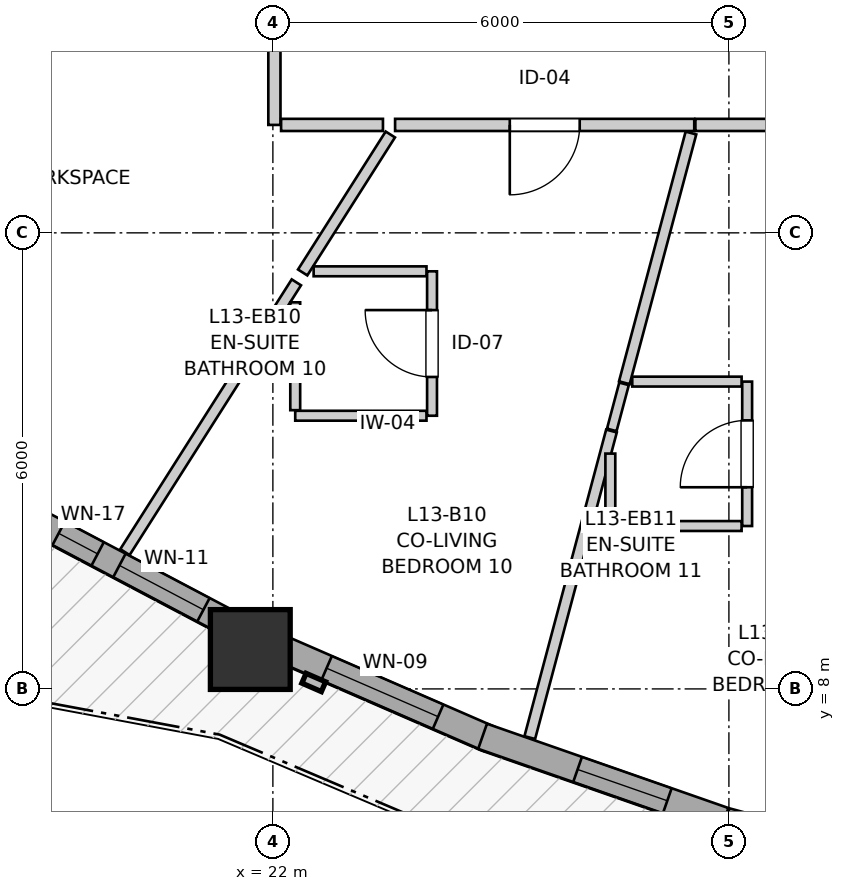
"""IFC4 building model, lengths in metres.
Left out: names, types, materials, properties, quantities, classifications, styles, units other than length and angle.
Written with IfcOpenShell. Run it as: python <this file> out.ifc"""

import sys

from ifc_helpers import new_model, si_unit, direction, frame, frame_2d, origin, origin_2d, place, context, subcontext, project, spatial, rectangle, extrude, source, transform, mapped, element, fill, save


model = new_model("IFC4")
c1 = context("Model", 3, precision=1e-05, world=origin(), true_north=direction((0.0, 1.0)))
c2 = subcontext(c1, "Body", "Model", "MODEL_VIEW")
j1 = project(units=[si_unit("LENGTHUNIT", "METRE"), si_unit("PLANEANGLEUNIT", "RADIAN")], contexts=[c1])
p1 = place(None, origin())
s1 = spatial("IfcSite", under=j1, at=p1, CompositionType="ELEMENT")
p2 = place(p1, origin())
s2 = spatial("IfcBuilding", under=s1, at=p2, CompositionType="ELEMENT")
p3 = place(p2, frame((0.0, 0.0, 46.2)))
s3 = spatial("IfcBuildingStorey", under=s2, at=p3, CompositionType="ELEMENT", Elevation=46.2)
m1 = source(origin(), c2, "Body", "SweptSolid", [
    extrude(rectangle(XDim=1.05, YDim=1.05, at=origin_2d()), origin(), (0.0, 0.0, 1.0), 2.94),
])
p4 = place(p3, frame((21.703, 8.518, 0.0), z_axis=(0.0, 0.0, 1.0), x_axis=(1.0, 0.0, 0.0)))
e1 = element("IfcColumn", 1, at=p4, inside=s3, PredefinedType="COLUMN", context=c2, shape_type="MappedRepresentation", body=[
    mapped(m1, transform((0.0, 0.0, 0.0), x_axis=(1.0, 0.0, 0.0), y_axis=(0.0, 1.0, 0.0), z_axis=(0.0, 0.0, 1.0), scale=1.0)),
])
p5 = place(p3, frame((18.842, 10.226, 0.0), z_axis=(0.0, 0.0, 1.0), x_axis=(0.884373657766, -0.466779641211, 0.0)))
e2 = element("IfcWall", 2, at=p5, inside=s3, PredefinedType="SOLIDWALL", context=c2, shape_type="SweptSolid", body=[
    extrude(rectangle(XDim=3.028, YDim=0.35, at=frame_2d((1.514, 0.0))), origin(), (0.0, 0.0, 1.0), 2.42),
])
p6 = place(p5, frame((0.384, 0.0, 0.82)))
e3 = element("IfcOpeningElement", 3, at=p6, cuts=e2, PredefinedType="OPENING", context=c2, shape_type="SweptSolid", body=[
    extrude(rectangle(XDim=0.58, YDim=1.35, at=frame_2d((0.29, 0.675))), frame((0.0, 0.185, 0.0), z_axis=(0.0, -1.0, 0.0), x_axis=(1.0, 0.0, 0.0)), (0.0, 0.0, 1.0), 0.37),
])
p7 = place(p5, frame((1.288, 0.0, 0.82)))
e4 = element("IfcOpeningElement", 4, at=p7, cuts=e2, PredefinedType="OPENING", context=c2, shape_type="SweptSolid", body=[
    extrude(rectangle(XDim=1.25, YDim=1.35, at=frame_2d((0.625, 0.675))), frame((0.0, 0.185, 0.0), z_axis=(0.0, -1.0, 0.0), x_axis=(1.0, 0.0, 0.0)), (0.0, 0.0, 1.0), 0.37),
])
p8 = place(p3, frame((22.048, 8.559, 0.0), z_axis=(0.0, 0.0, 1.0), x_axis=(0.9170891658, -0.398682156576, 0.0)))
e5 = element("IfcWall", 5, at=p8, inside=s3, PredefinedType="SOLIDWALL", context=c2, shape_type="SweptSolid", body=[
    extrude(rectangle(XDim=3.047, YDim=0.35, at=frame_2d((1.523, 0.0))), origin(), (0.0, 0.0, 1.0), 2.42),
])
p9 = place(p8, frame((0.719, 0.0, 0.82)))
e6 = element("IfcOpeningElement", 6, at=p9, cuts=e5, PredefinedType="OPENING", context=c2, shape_type="SweptSolid", body=[
    extrude(rectangle(XDim=1.6, YDim=1.35, at=frame_2d((0.8, 0.675))), frame((0.0, 0.185, 0.0), z_axis=(0.0, -1.0, 0.0), x_axis=(1.0, 0.0, 0.0)), (0.0, 0.0, 1.0), 0.37),
])
p10 = place(p3, frame((24.759, 7.377, 0.0), z_axis=(0.0, 0.0, 1.0), x_axis=(0.94414085716, -0.329542170051, 0.0)))
e7 = element("IfcWall", 7, at=p10, inside=s3, PredefinedType="SOLIDWALL", context=c2, shape_type="SweptSolid", body=[
    extrude(rectangle(XDim=3.364, YDim=0.35, at=frame_2d((1.682, 0.0))), origin(), (0.0, 0.0, 1.0), 2.42),
])
p11 = place(p10, frame((1.324, 0.0, 0.82)))
e8 = element("IfcOpeningElement", 8, at=p11, cuts=e7, PredefinedType="OPENING", context=c2, shape_type="SweptSolid", body=[
    extrude(rectangle(XDim=1.25, YDim=1.35, at=frame_2d((0.625, 0.675))), frame((0.0, 0.185, 0.0), z_axis=(0.0, -1.0, 0.0), x_axis=(1.0, 0.0, 0.0)), (0.0, 0.0, 1.0), 0.37),
])
p12 = place(p3, frame((27.961, 6.26, 0.0), z_axis=(0.0, 0.0, 1.0), x_axis=(0.96545566601, -0.260567375106, 0.0)))
e9 = element("IfcWall", 9, at=p12, inside=s3, PredefinedType="SOLIDWALL", context=c2, shape_type="SweptSolid", body=[
    extrude(rectangle(XDim=3.42, YDim=0.35, at=frame_2d((1.71, 0.0))), origin(), (0.0, 0.0, 1.0), 2.42),
])
p13 = place(p12, frame((0.738, 0.0, 0.82)))
e10 = element("IfcOpeningElement", 10, at=p13, cuts=e9, PredefinedType="OPENING", context=c2, shape_type="SweptSolid", body=[
    extrude(rectangle(XDim=1.25, YDim=1.35, at=frame_2d((0.625, 0.675))), frame((0.0, 0.185, 0.0), z_axis=(0.0, -1.0, 0.0), x_axis=(1.0, 0.0, 0.0)), (0.0, 0.0, 1.0), 0.37),
])
p14 = place(p3, frame((22.02, 15.42, 0.0), z_axis=(0.0, 0.0, 1.0), x_axis=(0.0, 1.0, 0.0)))
e11 = element("IfcWall", 11, at=p14, inside=s3, PredefinedType="PARTITIONING", context=c2, shape_type="SweptSolid", body=[
    extrude(rectangle(XDim=5.786, YDim=0.16, at=frame_2d((2.893, 0.0))), origin(), (0.0, 0.0, 1.0), 2.94),
])
p15 = place(p14, frame((2.405, 0.0, 0.0)))
e12 = element("IfcOpeningElement", 12, at=p15, cuts=e11, PredefinedType="OPENING", context=c2, shape_type="SweptSolid", body=[
    extrude(rectangle(XDim=0.96, YDim=2.1, at=frame_2d((0.48, 1.05))), frame((0.0, 0.09, 0.0), z_axis=(0.0, -1.0, 0.0), x_axis=(1.0, 0.0, 0.0)), (0.0, 0.0, 1.0), 0.18),
])
p16 = place(p3, frame((27.544, 15.42, 0.0), z_axis=(0.0, 0.0, 1.0), x_axis=(-1.0, 0.0, 0.0)))
e13 = element("IfcWall", 13, at=p16, inside=s3, PredefinedType="PARTITIONING", context=c2, shape_type="SweptSolid", body=[
    extrude(rectangle(XDim=3.936, YDim=0.16, at=frame_2d((1.968, 0.0))), origin(), (0.0, 0.0, 1.0), 2.94),
])
p17 = place(p16, frame((1.507, 0.0, 0.0)))
e14 = element("IfcOpeningElement", 14, at=p17, cuts=e13, PredefinedType="OPENING", context=c2, shape_type="SweptSolid", body=[
    extrude(rectangle(XDim=0.92, YDim=2.1, at=frame_2d((0.46, 1.05))), frame((0.0, 0.09, 0.0), z_axis=(0.0, -1.0, 0.0), x_axis=(1.0, 0.0, 0.0)), (0.0, 0.0, 1.0), 0.18),
])
p18 = place(p3, frame((30.484, 15.42, 0.0), z_axis=(0.0, 0.0, 1.0), x_axis=(-1.0, 0.0, 0.0)))
e15 = element("IfcWall", 15, at=p18, inside=s3, PredefinedType="PARTITIONING", context=c2, shape_type="SweptSolid", body=[
    extrude(rectangle(XDim=2.925, YDim=0.16, at=frame_2d((1.462, 0.0))), origin(), (0.0, 0.0, 1.0), 2.94),
])
p19 = place(p18, frame((1.025, 0.0, 0.0)))
e16 = element("IfcOpeningElement", 16, at=p19, cuts=e15, PredefinedType="OPENING", context=c2, shape_type="SweptSolid", body=[
    extrude(rectangle(XDim=0.92, YDim=2.1, at=frame_2d((0.46, 1.05))), frame((0.0, 0.09, 0.0), z_axis=(0.0, -1.0, 0.0), x_axis=(1.0, 0.0, 0.0)), (0.0, 0.0, 1.0), 0.18),
])
p20 = place(p3, frame((24.094, 11.594, 0.0), z_axis=(0.0, 0.0, 1.0), x_axis=(0.0, 1.0, 0.0)))
e17 = element("IfcWall", 17, at=p20, inside=s3, PredefinedType="PARTITIONING", context=c2, shape_type="SweptSolid", body=[
    extrude(rectangle(XDim=1.9, YDim=0.13, at=frame_2d((0.95, 0.0))), origin(), (0.0, 0.0, 1.0), 2.94),
])
p21 = place(p20, frame((0.51, 0.0, 0.0)))
e18 = element("IfcOpeningElement", 18, at=p21, cuts=e17, PredefinedType="OPENING", context=c2, shape_type="SweptSolid", body=[
    extrude(rectangle(XDim=0.88, YDim=2.05, at=frame_2d((0.44, 1.025))), frame((0.0, 0.075, 0.0), z_axis=(0.0, -1.0, 0.0), x_axis=(1.0, 0.0, 0.0)), (0.0, 0.0, 1.0), 0.15),
])
p22 = place(p3, frame((28.24, 10.143, 0.0), z_axis=(0.0, 0.0, 1.0), x_axis=(0.0, 1.0, 0.0)))
e19 = element("IfcWall", 19, at=p22, inside=s3, PredefinedType="PARTITIONING", context=c2, shape_type="SweptSolid", body=[
    extrude(rectangle(XDim=1.9, YDim=0.13, at=frame_2d((0.95, 0.0))), origin(), (0.0, 0.0, 1.0), 2.94),
])
p23 = place(p22, frame((0.51, 0.0, 0.0)))
e20 = element("IfcOpeningElement", 20, at=p23, cuts=e19, PredefinedType="OPENING", context=c2, shape_type="SweptSolid", body=[
    extrude(rectangle(XDim=0.88, YDim=2.05, at=frame_2d((0.44, 1.025))), frame((0.0, 0.075, 0.0), z_axis=(0.0, -1.0, 0.0), x_axis=(1.0, 0.0, 0.0)), (0.0, 0.0, 1.0), 0.15),
])
p24 = place(p3, frame((12.009, 15.406, 0.0), z_axis=(0.0, 0.0, 1.0), x_axis=(0.865925986209, 0.500172156771, 0.0)))
e21 = element("IfcWall", 21, at=p24, inside=s3, PredefinedType="PARTITIONING", context=c2, shape_type="SweptSolid", body=[
    extrude(rectangle(XDim=11.419, YDim=0.145, at=frame_2d((5.709, 0.0))), origin(), (0.0, 0.0, 1.0), 2.94),
])
p25 = place(p3, frame((20.054, 9.8, 0.0), z_axis=(0.0, 0.0, 1.0), x_axis=(0.536345686693, 0.843998403059, 0.0)))
e22 = element("IfcWall", 22, at=p25, inside=s3, PredefinedType="PARTITIONING", context=c2, shape_type="SweptSolid", body=[
    extrude(rectangle(XDim=4.205, YDim=0.145, at=frame_2d((2.103, 0.0))), origin(), (0.0, 0.0, 1.0), 2.94),
])
p26 = place(p3, frame((25.38, 7.36, 0.0), z_axis=(0.0, 0.0, 1.0), x_axis=(0.257575283531, 0.966258233245, 0.0)))
e23 = element("IfcWall", 23, at=p26, inside=s3, PredefinedType="PARTITIONING", context=c2, shape_type="SweptSolid", body=[
    extrude(rectangle(XDim=4.174, YDim=0.145, at=frame_2d((2.087, 0.0))), origin(), (0.0, 0.0, 1.0), 2.94),
])
p27 = place(p3, frame((26.624, 12.028, 0.0), z_axis=(0.0, 0.0, 1.0), x_axis=(0.257743083598, 0.966213487205, 0.0)))
e24 = element("IfcWall", 24, at=p27, inside=s3, PredefinedType="PARTITIONING", context=c2, shape_type="SweptSolid", body=[
    extrude(rectangle(XDim=3.401, YDim=0.145, at=frame_2d((1.7, 0.0))), origin(), (0.0, 0.0, 1.0), 2.94),
])
p28 = place(p3, frame((22.392, 13.479, 0.0), z_axis=(0.0, 0.0, 1.0), x_axis=(0.53614810629, 0.844123929362, 0.0)))
e25 = element("IfcWall", 25, at=p28, inside=s3, PredefinedType="PARTITIONING", context=c2, shape_type="SweptSolid", body=[
    extrude(rectangle(XDim=2.151, YDim=0.145, at=frame_2d((1.075, 0.0))), origin(), (0.0, 0.0, 1.0), 2.94),
])
p29 = place(p3, frame((22.294, 11.594, 0.0), z_axis=(0.0, 0.0, 1.0), x_axis=(1.0, 0.0, 0.0)))
e26 = element("IfcWall", 26, at=p29, inside=s3, PredefinedType="PARTITIONING", context=c2, shape_type="SweptSolid", body=[
    extrude(rectangle(XDim=1.727, YDim=0.13, at=frame_2d((0.864, 0.0))), origin(), (0.0, 0.0, 1.0), 2.94),
])
p30 = place(p3, frame((26.44, 10.143, 0.0), z_axis=(0.0, 0.0, 1.0), x_axis=(1.0, 0.0, 0.0)))
e27 = element("IfcWall", 27, at=p30, inside=s3, PredefinedType="PARTITIONING", context=c2, shape_type="SweptSolid", body=[
    extrude(rectangle(XDim=1.727, YDim=0.13, at=frame_2d((0.864, 0.0))), origin(), (0.0, 0.0, 1.0), 2.508),
])
p31 = place(p3, frame((22.294, 11.667, 0.0), z_axis=(0.0, 0.0, 1.0), x_axis=(0.0, 1.0, 0.0)))
e28 = element("IfcWall", 28, at=p31, inside=s3, PredefinedType="PARTITIONING", context=c2, shape_type="SweptSolid", body=[
    extrude(rectangle(XDim=1.419, YDim=0.13, at=frame_2d((0.709, 0.0))), origin(), (0.0, 0.0, 1.0), 2.94),
])
p32 = place(p3, frame((22.536, 13.494, 0.0), z_axis=(0.0, 0.0, 1.0), x_axis=(1.0, 0.0, 0.0)))
e29 = element("IfcWall", 29, at=p32, inside=s3, PredefinedType="PARTITIONING", context=c2, shape_type="SweptSolid", body=[
    extrude(rectangle(XDim=1.485, YDim=0.13, at=frame_2d((0.742, 0.0))), origin(), (0.0, 0.0, 1.0), 2.94),
])
p33 = place(p3, frame((26.729, 12.043, 0.0), z_axis=(0.0, 0.0, 1.0), x_axis=(1.0, 0.0, 0.0)))
e30 = element("IfcWall", 30, at=p33, inside=s3, PredefinedType="PARTITIONING", context=c2, shape_type="SweptSolid", body=[
    extrude(rectangle(XDim=1.438, YDim=0.13, at=frame_2d((0.719, 0.0))), origin(), (0.0, 0.0, 1.0), 2.94),
])
p34 = place(p3, frame((22.108, 15.42, 0.0), z_axis=(0.0, 0.0, 1.0), x_axis=(1.0, 0.0, 0.0)))
e31 = element("IfcWall", 31, at=p34, inside=s3, PredefinedType="PARTITIONING", context=c2, shape_type="SweptSolid", body=[
    extrude(rectangle(XDim=1.34, YDim=0.16, at=frame_2d((0.67, 0.0))), origin(), (0.0, 0.0, 1.0), 2.94),
])
p35 = place(p3, frame((26.44, 10.216, 0.0), z_axis=(0.0, 0.0, 1.0), x_axis=(0.0, 1.0, 0.0)))
e32 = element("IfcWall", 32, at=p35, inside=s3, PredefinedType="PARTITIONING", context=c2, shape_type="SweptSolid", body=[
    extrude(rectangle(XDim=0.88, YDim=0.13, at=frame_2d((0.44, 0.0))), origin(), (0.0, 0.0, 1.0), 2.94),
])
p36 = place(p3, frame((26.459, 11.407, 0.0), z_axis=(0.0, 0.0, 1.0), x_axis=(0.256984017378, 0.966415653232, 0.0)))
e33 = element("IfcWall", 33, at=p36, inside=s3, PredefinedType="PARTITIONING", context=c2, shape_type="SweptSolid", body=[
    extrude(rectangle(XDim=0.627, YDim=0.13, at=frame_2d((0.313, 0.0))), origin(), (0.0, 0.0, 1.0), 2.94),
])
m2 = source(origin(), c2, "Body", "SweptSolid", [
    extrude(rectangle(XDim=0.58, YDim=1.35, at=frame_2d((0.29, 0.675))), frame((0.0, 0.03, 0.0), z_axis=(0.0, -1.0, 0.0), x_axis=(1.0, 0.0, 0.0)), (0.0, 0.0, 1.0), 0.06),
])
p37 = place(p6, origin())
e34 = element("IfcWindow", 34, at=p37, inside=s3, PartitioningType="SINGLE_PANEL", PredefinedType="WINDOW", context=c2, shape_type="MappedRepresentation", body=[
    mapped(m2, transform((0.0, 0.0, 0.0), x_axis=(1.0, 0.0, 0.0), y_axis=(0.0, 1.0, 0.0), z_axis=(0.0, 0.0, 1.0), scale=1.0)),
])
fill(e3, e34)
m3 = source(origin(), c2, "Body", "SweptSolid", [
    extrude(rectangle(XDim=1.25, YDim=1.35, at=frame_2d((0.625, 0.675))), frame((0.0, 0.03, 0.0), z_axis=(0.0, -1.0, 0.0), x_axis=(1.0, 0.0, 0.0)), (0.0, 0.0, 1.0), 0.06),
])
p38 = place(p7, origin())
e35 = element("IfcWindow", 35, at=p38, inside=s3, PartitioningType="SINGLE_PANEL", PredefinedType="WINDOW", context=c2, shape_type="MappedRepresentation", body=[
    mapped(m3, transform((0.0, 0.0, 0.0), x_axis=(1.0, 0.0, 0.0), y_axis=(0.0, 1.0, 0.0), z_axis=(0.0, 0.0, 1.0), scale=1.0)),
])
fill(e4, e35)
m4 = source(origin(), c2, "Body", "SweptSolid", [
    extrude(rectangle(XDim=1.6, YDim=1.35, at=frame_2d((0.8, 0.675))), frame((0.0, 0.03, 0.0), z_axis=(0.0, -1.0, 0.0), x_axis=(1.0, 0.0, 0.0)), (0.0, 0.0, 1.0), 0.06),
])
p39 = place(p9, origin())
e36 = element("IfcWindow", 36, at=p39, inside=s3, PartitioningType="SINGLE_PANEL", PredefinedType="WINDOW", context=c2, shape_type="MappedRepresentation", body=[
    mapped(m4, transform((0.0, 0.0, 0.0), x_axis=(1.0, 0.0, 0.0), y_axis=(0.0, 1.0, 0.0), z_axis=(0.0, 0.0, 1.0), scale=1.0)),
])
fill(e6, e36)
p40 = place(p11, origin())
e37 = element("IfcWindow", 37, at=p40, inside=s3, PartitioningType="SINGLE_PANEL", PredefinedType="WINDOW", context=c2, shape_type="MappedRepresentation", body=[
    mapped(m3, transform((0.0, 0.0, 0.0), x_axis=(1.0, 0.0, 0.0), y_axis=(0.0, 1.0, 0.0), z_axis=(0.0, 0.0, 1.0), scale=1.0)),
])
fill(e8, e37)
m5 = source(origin(), c2, "Body", "SweptSolid", [
    extrude(rectangle(XDim=0.92, YDim=2.1, at=frame_2d((0.46, 1.05))), frame((0.0, 0.025, 0.0), z_axis=(0.0, -1.0, 0.0), x_axis=(1.0, 0.0, 0.0)), (0.0, 0.0, 1.0), 0.05),
])
p41 = place(p17, origin())
e38 = element("IfcDoor", 38, at=p41, inside=s3, OperationType="SINGLE_SWING_RIGHT", PredefinedType="DOOR", context=c2, shape_type="MappedRepresentation", body=[
    mapped(m5, transform((0.0, 0.0, 0.0), x_axis=(1.0, 0.0, 0.0), y_axis=(0.0, 1.0, 0.0), z_axis=(0.0, 0.0, 1.0), scale=1.0)),
])
fill(e14, e38)
m6 = source(origin(), c2, "Body", "SweptSolid", [
    extrude(rectangle(XDim=0.88, YDim=2.05, at=frame_2d((0.44, 1.025))), frame((0.0, 0.025, 0.0), z_axis=(0.0, -1.0, 0.0), x_axis=(1.0, 0.0, 0.0)), (0.0, 0.0, 1.0), 0.05),
])
p42 = place(p21, origin())
e39 = element("IfcDoor", 39, at=p42, inside=s3, OperationType="SINGLE_SWING_RIGHT", PredefinedType="DOOR", context=c2, shape_type="MappedRepresentation", body=[
    mapped(m6, transform((0.0, 0.0, 0.0), x_axis=(1.0, 0.0, 0.0), y_axis=(0.0, 1.0, 0.0), z_axis=(0.0, 0.0, 1.0), scale=1.0)),
])
fill(e18, e39)
p43 = place(p23, origin())
e40 = element("IfcDoor", 40, at=p43, inside=s3, OperationType="SINGLE_SWING_LEFT", PredefinedType="DOOR", context=c2, shape_type="MappedRepresentation", body=[
    mapped(m6, transform((0.0, 0.0, 0.0), x_axis=(1.0, 0.0, 0.0), y_axis=(0.0, 1.0, 0.0), z_axis=(0.0, 0.0, 1.0), scale=1.0)),
])
fill(e20, e40)
save(model, sys.argv[1])
